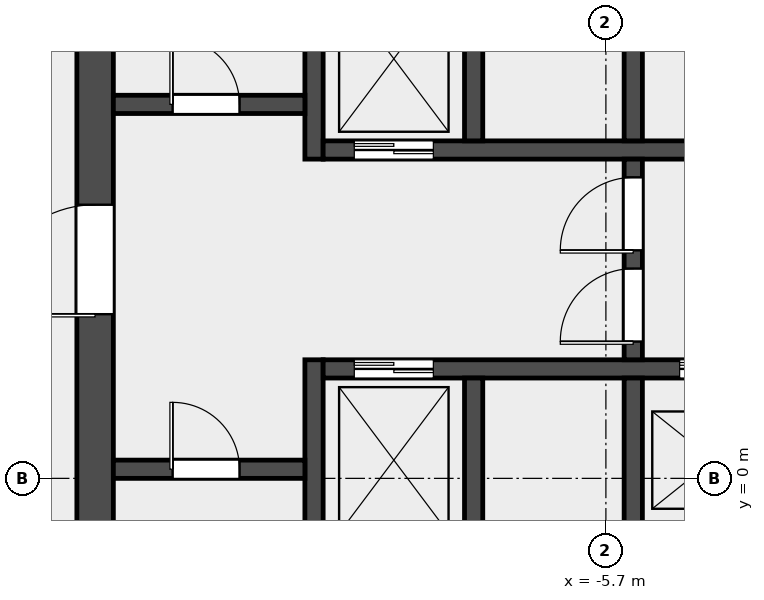
"""IFC4 building model, lengths in metres.
Left out: names, types, materials, properties, quantities, classifications, styles, units other than length and angle.
Written with IfcOpenShell. Run it as: python <this file> out.ifc"""

import sys

from ifc_helpers import new_model, si_unit, direction, frame, frame_2d, origin, place, context, subcontext, project, spatial, rectangle, extrude, element, fill, save


model = new_model("IFC4")
c1 = context("Model", 3, precision=1e-05, world=origin(), true_north=direction((0.0, 1.0)))
c2 = subcontext(c1, "Body", "Model", "MODEL_VIEW")
j1 = project(units=[si_unit("LENGTHUNIT", "METRE"), si_unit("PLANEANGLEUNIT", "RADIAN")], contexts=[c1])
p1 = place(None, origin())
s1 = spatial("IfcSite", under=j1, at=p1, CompositionType="ELEMENT")
p2 = place(p1, origin())
s2 = spatial("IfcBuilding", under=s1, at=p2, CompositionType="ELEMENT")
p3 = place(p2, frame((0.0, 0.0, 50.2)))
s3 = spatial("IfcBuildingStorey", under=s2, at=p3, CompositionType="ELEMENT", Elevation=50.2)
p4 = place(p3, frame((-14.1, -6.6, 0.0), z_axis=(0.0, 0.0, 1.0), x_axis=(0.0, 1.0, 0.0)))
e1 = element("IfcWall", 1, at=p4, inside=s3, PredefinedType="SHEAR", context=c2, shape_type="SweptSolid", body=[
    extrude(rectangle(XDim=19.5, YDim=0.6, at=frame_2d((9.75, 0.0))), origin(), (0.0, 0.0, 1.0), 4.5),
])
p5 = place(p4, frame((9.3, 0.0, 0.0)))
e2 = element("IfcOpeningElement", 2, at=p5, cuts=e1, PredefinedType="OPENING", context=c2, shape_type="SweptSolid", body=[
    extrude(rectangle(XDim=1.8, YDim=2.1, at=frame_2d((0.9, 1.05))), frame((0.0, 0.312, 0.0), z_axis=(0.0, -1.0, 0.0), x_axis=(1.0, 0.0, 0.0)), (0.0, 0.0, 1.0), 0.624),
])
p6 = place(p3, frame((-10.5, -6.6, 0.0), z_axis=(0.0, 0.0, 1.0), x_axis=(0.0, 1.0, 0.0)))
e3 = element("IfcWall", 3, at=p6, inside=s3, PredefinedType="SHEAR", context=c2, shape_type="SweptSolid", body=[
    extrude(rectangle(XDim=8.55, YDim=0.3, at=frame_2d((4.275, 0.0))), origin(), (0.0, 0.0, 1.0), 4.5),
])
p7 = place(p3, frame((-10.5, 5.25, 0.0), z_axis=(0.0, 0.0, 1.0), x_axis=(0.0, 1.0, 0.0)))
e4 = element("IfcWall", 4, at=p7, inside=s3, PredefinedType="SHEAR", context=c2, shape_type="SweptSolid", body=[
    extrude(rectangle(XDim=7.65, YDim=0.3, at=frame_2d((3.825, 0.0))), origin(), (0.0, 0.0, 1.0), 4.5),
])
p8 = place(p3, frame((-13.8, 0.15, 0.0), z_axis=(0.0, 0.0, 1.0), x_axis=(1.0, 0.0, 0.0)))
e5 = element("IfcWall", 5, at=p8, inside=s3, PredefinedType="SOLIDWALL", context=c2, shape_type="SweptSolid", body=[
    extrude(rectangle(XDim=3.15, YDim=0.3, at=frame_2d((1.575, 0.0))), origin(), (0.0, 0.0, 1.0), 4.5),
])
p9 = place(p8, frame((0.975, 0.0, 0.0)))
e6 = element("IfcOpeningElement", 6, at=p9, cuts=e5, PredefinedType="OPENING", context=c2, shape_type="SweptSolid", body=[
    extrude(rectangle(XDim=1.1, YDim=2.1, at=frame_2d((0.55, 1.05))), frame((0.0, 0.162, 0.0), z_axis=(0.0, -1.0, 0.0), x_axis=(1.0, 0.0, 0.0)), (0.0, 0.0, 1.0), 0.324),
])
p10 = place(p3, frame((-13.8, 6.15, 0.0), z_axis=(0.0, 0.0, 1.0), x_axis=(1.0, 0.0, 0.0)))
e7 = element("IfcWall", 7, at=p10, inside=s3, PredefinedType="SOLIDWALL", context=c2, shape_type="SweptSolid", body=[
    extrude(rectangle(XDim=3.15, YDim=0.3, at=frame_2d((1.575, 0.0))), origin(), (0.0, 0.0, 1.0), 4.5),
])
p11 = place(p10, frame((0.975, 0.0, 0.0)))
e8 = element("IfcOpeningElement", 8, at=p11, cuts=e7, PredefinedType="OPENING", context=c2, shape_type="SweptSolid", body=[
    extrude(rectangle(XDim=1.1, YDim=2.1, at=frame_2d((0.55, 1.05))), frame((0.0, 0.162, 0.0), z_axis=(0.0, -1.0, 0.0), x_axis=(1.0, 0.0, 0.0)), (0.0, 0.0, 1.0), 0.324),
])
p12 = place(p3, frame((-10.35, 1.8, 0.0), z_axis=(0.0, 0.0, 1.0), x_axis=(1.0, 0.0, 0.0)))
e9 = element("IfcWall", 9, at=p12, inside=s3, PredefinedType="SOLIDWALL", context=c2, shape_type="SweptSolid", body=[
    extrude(rectangle(XDim=20.7, YDim=0.3, at=frame_2d((10.35, 0.0))), origin(), (0.0, 0.0, 1.0), 4.5),
])
p13 = place(p12, frame((0.512, 0.0, 0.0)))
e10 = element("IfcOpeningElement", 10, at=p13, cuts=e9, PredefinedType="OPENING", context=c2, shape_type="SweptSolid", body=[
    extrude(rectangle(XDim=1.3, YDim=2.1, at=frame_2d((0.65, 1.05))), frame((0.0, 0.162, 0.0), z_axis=(0.0, -1.0, 0.0), x_axis=(1.0, 0.0, 0.0)), (0.0, 0.0, 1.0), 0.324),
])
p14 = place(p12, frame((5.863, 0.0, 0.0)))
e11 = element("IfcOpeningElement", 11, at=p14, cuts=e9, PredefinedType="OPENING", context=c2, shape_type="SweptSolid", body=[
    extrude(rectangle(XDim=1.1, YDim=2.1, at=frame_2d((0.55, 1.05))), frame((0.0, 0.162, 0.0), z_axis=(0.0, -1.0, 0.0), x_axis=(1.0, 0.0, 0.0)), (0.0, 0.0, 1.0), 0.324),
])
p15 = place(p12, frame((8.488, 0.0, 0.0)))
e12 = element("IfcOpeningElement", 12, at=p15, cuts=e9, PredefinedType="OPENING", context=c2, shape_type="SweptSolid", body=[
    extrude(rectangle(XDim=1.1, YDim=2.1, at=frame_2d((0.55, 1.05))), frame((0.0, 0.162, 0.0), z_axis=(0.0, -1.0, 0.0), x_axis=(1.0, 0.0, 0.0)), (0.0, 0.0, 1.0), 0.324),
])
p16 = place(p12, frame((11.113, 0.0, 0.0)))
e13 = element("IfcOpeningElement", 13, at=p16, cuts=e9, PredefinedType="OPENING", context=c2, shape_type="SweptSolid", body=[
    extrude(rectangle(XDim=1.1, YDim=2.1, at=frame_2d((0.55, 1.05))), frame((0.0, 0.162, 0.0), z_axis=(0.0, -1.0, 0.0), x_axis=(1.0, 0.0, 0.0)), (0.0, 0.0, 1.0), 0.324),
])
p17 = place(p12, frame((13.738, 0.0, 0.0)))
e14 = element("IfcOpeningElement", 14, at=p17, cuts=e9, PredefinedType="OPENING", context=c2, shape_type="SweptSolid", body=[
    extrude(rectangle(XDim=1.1, YDim=2.1, at=frame_2d((0.55, 1.05))), frame((0.0, 0.162, 0.0), z_axis=(0.0, -1.0, 0.0), x_axis=(1.0, 0.0, 0.0)), (0.0, 0.0, 1.0), 0.324),
])
p18 = place(p12, frame((16.363, 0.0, 0.0)))
e15 = element("IfcOpeningElement", 15, at=p18, cuts=e9, PredefinedType="OPENING", context=c2, shape_type="SweptSolid", body=[
    extrude(rectangle(XDim=1.1, YDim=2.1, at=frame_2d((0.55, 1.05))), frame((0.0, 0.162, 0.0), z_axis=(0.0, -1.0, 0.0), x_axis=(1.0, 0.0, 0.0)), (0.0, 0.0, 1.0), 0.324),
])
p19 = place(p12, frame((18.988, 0.0, 0.0)))
e16 = element("IfcOpeningElement", 16, at=p19, cuts=e9, PredefinedType="OPENING", context=c2, shape_type="SweptSolid", body=[
    extrude(rectangle(XDim=1.1, YDim=2.1, at=frame_2d((0.55, 1.05))), frame((0.0, 0.162, 0.0), z_axis=(0.0, -1.0, 0.0), x_axis=(1.0, 0.0, 0.0)), (0.0, 0.0, 1.0), 0.324),
])
p20 = place(p3, frame((-10.35, 5.4, 0.0), z_axis=(0.0, 0.0, 1.0), x_axis=(1.0, 0.0, 0.0)))
e17 = element("IfcWall", 17, at=p20, inside=s3, PredefinedType="SOLIDWALL", context=c2, shape_type="SweptSolid", body=[
    extrude(rectangle(XDim=20.7, YDim=0.3, at=frame_2d((10.35, 0.0))), origin(), (0.0, 0.0, 1.0), 4.5),
])
p21 = place(p20, frame((0.512, 0.0, 0.0)))
e18 = element("IfcOpeningElement", 18, at=p21, cuts=e17, PredefinedType="OPENING", context=c2, shape_type="SweptSolid", body=[
    extrude(rectangle(XDim=1.3, YDim=2.1, at=frame_2d((0.65, 1.05))), frame((0.0, 0.162, 0.0), z_axis=(0.0, -1.0, 0.0), x_axis=(1.0, 0.0, 0.0)), (0.0, 0.0, 1.0), 0.324),
])
for number, where, z_axis, x_axis in (
    (19, (-7.875, -1.05, 0.0), (0.0, 0.0, 1.0), (0.0, 1.0, 0.0)),
    (20, (-5.25, -1.05, 0.0), (0.0, 0.0, 1.0), (0.0, 1.0, 0.0)),
    (21, (-7.875, 5.55, 0.0), (0.0, 0.0, 1.0), (0.0, 1.0, 0.0)),
    (22, (-5.25, 5.55, 0.0), (0.0, 0.0, 1.0), (0.0, 1.0, 0.0)),
):
    element("IfcWall", number, at=place(p3, frame(where, z_axis=z_axis, x_axis=x_axis)), inside=s3, PredefinedType="SOLIDWALL", context=c2, shape_type="SweptSolid", body=[
        extrude(rectangle(XDim=2.7, YDim=0.3, at=frame_2d((1.35, 0.0))), origin(), (0.0, 0.0, 1.0), 4.5),
    ])
p22 = place(p3, frame((-5.25, 1.95, 0.0), z_axis=(0.0, 0.0, 1.0), x_axis=(0.0, 1.0, 0.0)))
e23 = element("IfcWall", 23, at=p22, inside=s3, PredefinedType="SOLIDWALL", context=c2, shape_type="SweptSolid", body=[
    extrude(rectangle(XDim=3.3, YDim=0.3, at=frame_2d((1.65, 0.0))), origin(), (0.0, 0.0, 1.0), 4.5),
])
p23 = place(p22, frame((0.3, 0.0, 0.0)))
e24 = element("IfcOpeningElement", 24, at=p23, cuts=e23, PredefinedType="OPENING", context=c2, shape_type="SweptSolid", body=[
    extrude(rectangle(XDim=1.2, YDim=2.1, at=frame_2d((0.6, 1.05))), frame((0.0, 0.162, 0.0), z_axis=(0.0, -1.0, 0.0), x_axis=(1.0, 0.0, 0.0)), (0.0, 0.0, 1.0), 0.324),
])
p24 = place(p22, frame((1.8, 0.0, 0.0)))
e25 = element("IfcOpeningElement", 25, at=p24, cuts=e23, PredefinedType="OPENING", context=c2, shape_type="SweptSolid", body=[
    extrude(rectangle(XDim=1.2, YDim=2.1, at=frame_2d((0.6, 1.05))), frame((0.0, 0.162, 0.0), z_axis=(0.0, -1.0, 0.0), x_axis=(1.0, 0.0, 0.0)), (0.0, 0.0, 1.0), 0.324),
])
p25 = place(p9, origin())
e26 = element("IfcDoor", 26, at=p25, inside=s3, OperationType="SINGLE_SWING_LEFT", PredefinedType="DOOR", context=c2, shape_type="SweptSolid", body=[
    extrude(rectangle(XDim=1.1, YDim=2.1, at=frame_2d((0.55, 1.05))), frame((0.0, 0.025, 0.0), z_axis=(0.0, -1.0, 0.0), x_axis=(1.0, 0.0, 0.0)), (0.0, 0.0, 1.0), 0.05),
])
fill(e6, e26)
p26 = place(p11, origin())
e27 = element("IfcDoor", 27, at=p26, inside=s3, OperationType="SINGLE_SWING_LEFT", PredefinedType="DOOR", context=c2, shape_type="SweptSolid", body=[
    extrude(rectangle(XDim=1.1, YDim=2.1, at=frame_2d((0.55, 1.05))), frame((0.0, 0.025, 0.0), z_axis=(0.0, -1.0, 0.0), x_axis=(1.0, 0.0, 0.0)), (0.0, 0.0, 1.0), 0.05),
])
fill(e8, e27)
p27 = place(p5, origin())
e28 = element("IfcDoor", 28, at=p27, inside=s3, OperationType="DOUBLE_DOOR_SINGLE_SWING", PredefinedType="DOOR", context=c2, shape_type="SweptSolid", body=[
    extrude(rectangle(XDim=1.8, YDim=2.1, at=frame_2d((0.9, 1.05))), frame((0.0, 0.025, 0.0), z_axis=(0.0, -1.0, 0.0), x_axis=(1.0, 0.0, 0.0)), (0.0, 0.0, 1.0), 0.05),
])
fill(e2, e28)
p28 = place(p23, origin())
e29 = element("IfcDoor", 29, at=p28, inside=s3, OperationType="SINGLE_SWING_LEFT", PredefinedType="DOOR", context=c2, shape_type="SweptSolid", body=[
    extrude(rectangle(XDim=1.2, YDim=2.1, at=frame_2d((0.6, 1.05))), frame((0.0, 0.025, 0.0), z_axis=(0.0, -1.0, 0.0), x_axis=(1.0, 0.0, 0.0)), (0.0, 0.0, 1.0), 0.05),
])
fill(e24, e29)
p29 = place(p24, origin())
e30 = element("IfcDoor", 30, at=p29, inside=s3, OperationType="SINGLE_SWING_RIGHT", PredefinedType="DOOR", context=c2, shape_type="SweptSolid", body=[
    extrude(rectangle(XDim=1.2, YDim=2.1, at=frame_2d((0.6, 1.05))), frame((0.0, 0.025, 0.0), z_axis=(0.0, -1.0, 0.0), x_axis=(1.0, 0.0, 0.0)), (0.0, 0.0, 1.0), 0.05),
])
fill(e25, e30)
p30 = place(p13, origin())
e31 = element("IfcDoor", 31, at=p30, inside=s3, OperationType="DOUBLE_DOOR_SLIDING", PredefinedType="DOOR", context=c2, shape_type="SweptSolid", body=[
    extrude(rectangle(XDim=1.3, YDim=2.1, at=frame_2d((0.65, 1.05))), frame((0.0, 0.025, 0.0), z_axis=(0.0, -1.0, 0.0), x_axis=(1.0, 0.0, 0.0)), (0.0, 0.0, 1.0), 0.05),
])
fill(e10, e31)
p31 = place(p14, origin())
e32 = element("IfcDoor", 32, at=p31, inside=s3, OperationType="DOUBLE_DOOR_SLIDING", PredefinedType="DOOR", context=c2, shape_type="SweptSolid", body=[
    extrude(rectangle(XDim=1.1, YDim=2.1, at=frame_2d((0.55, 1.05))), frame((0.0, 0.025, 0.0), z_axis=(0.0, -1.0, 0.0), x_axis=(1.0, 0.0, 0.0)), (0.0, 0.0, 1.0), 0.05),
])
fill(e11, e32)
p32 = place(p21, origin())
e33 = element("IfcDoor", 33, at=p32, inside=s3, OperationType="DOUBLE_DOOR_SLIDING", PredefinedType="DOOR", context=c2, shape_type="SweptSolid", body=[
    extrude(rectangle(XDim=1.3, YDim=2.1, at=frame_2d((0.65, 1.05))), frame((0.0, 0.025, 0.0), z_axis=(0.0, -1.0, 0.0), x_axis=(1.0, 0.0, 0.0)), (0.0, 0.0, 1.0), 0.05),
])
fill(e18, e33)
save(model, sys.argv[1])
